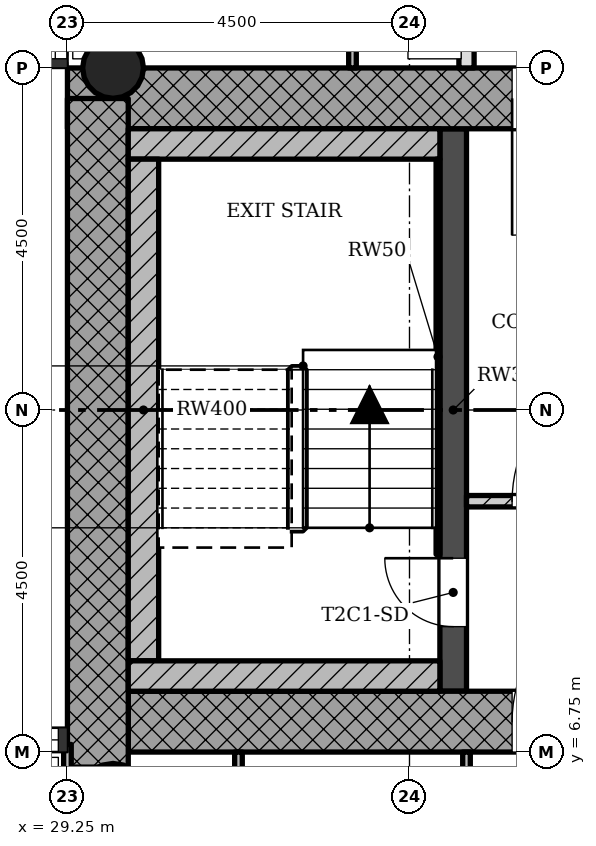
"""IFC4 building model, lengths in metres.
Left out: names, types, materials, properties, quantities, classifications, styles, units other than length and angle.
Written with IfcOpenShell. Run it as: python <this file> out.ifc"""

import sys

from ifc_helpers import new_model, si_unit, direction, frame, frame_2d, origin, origin_2d, place, context, subcontext, project, spatial, rectangle, hollow_circle, extrude, element, fill, save


model = new_model("IFC4")
c1 = context("Model", 3, precision=1e-05, world=origin(), true_north=direction((0.0, 1.0)))
c2 = subcontext(c1, "Body", "Model", "MODEL_VIEW")
j1 = project(units=[si_unit("LENGTHUNIT", "METRE"), si_unit("PLANEANGLEUNIT", "RADIAN")], contexts=[c1])
p1 = place(None, origin())
s1 = spatial("IfcSite", under=j1, at=p1, CompositionType="ELEMENT")
p2 = place(p1, origin())
s2 = spatial("IfcBuilding", under=s1, at=p2, CompositionType="ELEMENT")
p3 = place(p2, frame((0.0, 0.0, 174.5)))
s3 = spatial("IfcBuildingStorey", under=s2, at=p3, CompositionType="ELEMENT", Elevation=174.5)
p4 = place(p3, frame((30.05, 7.15, 0.0), z_axis=(0.0, 0.0, 1.0), x_axis=(1.0, 0.0, 0.0)))
e1 = element("IfcWall", 1, at=p4, inside=s3, PredefinedType="SHEAR", context=c2, shape_type="SweptSolid", body=[
    extrude(rectangle(XDim=12.7, YDim=0.8, at=frame_2d((6.35, 0.0))), origin(), (0.0, 0.0, 1.0), 3.4),
])
p5 = place(p4, frame((5.05, 0.0, 0.0)))
e2 = element("IfcOpeningElement", 2, at=p5, cuts=e1, PredefinedType="OPENING", context=c2, shape_type="SweptSolid", body=[
    extrude(rectangle(XDim=1.8, YDim=2.1, at=frame_2d((0.9, 1.05))), frame((0.0, 0.41, 0.0), z_axis=(0.0, -1.0, 0.0), x_axis=(1.0, 0.0, 0.0)), (0.0, 0.0, 1.0), 0.82),
])
p6 = place(p3, frame((41.95, 15.35, 0.0), z_axis=(0.0, 0.0, 1.0), x_axis=(-1.0, 0.0, 0.0)))
e3 = element("IfcWall", 3, at=p6, inside=s3, PredefinedType="SHEAR", context=c2, shape_type="SweptSolid", body=[
    extrude(rectangle(XDim=12.7, YDim=0.8, at=frame_2d((6.35, 0.0))), origin(), (0.0, 0.0, 1.0), 3.4),
])
p7 = place(p6, frame((5.05, 0.0, 0.0)))
e4 = element("IfcOpeningElement", 4, at=p7, cuts=e3, PredefinedType="OPENING", context=c2, shape_type="SweptSolid", body=[
    extrude(rectangle(XDim=1.8, YDim=2.1, at=frame_2d((0.9, 1.05))), frame((0.0, 0.41, 0.0), z_axis=(0.0, -1.0, 0.0), x_axis=(1.0, 0.0, 0.0)), (0.0, 0.0, 1.0), 0.82),
])
p8 = place(p3, frame((29.65, 15.348, 0.0), z_axis=(0.0, 0.0, 1.0), x_axis=(0.0, -1.0, 0.0)))
e5 = element("IfcWall", 5, at=p8, inside=s3, PredefinedType="SHEAR", context=c2, shape_type="SweptSolid", body=[
    extrude(rectangle(XDim=8.796, YDim=0.8, at=frame_2d((4.398, 0.0))), origin(), (0.0, 0.0, 1.0), 3.4),
])
p9 = place(p3, frame((34.325, 7.55, 0.0), z_axis=(0.0, 0.0, 1.0), x_axis=(0.0, 1.0, 0.0)))
e6 = element("IfcWall", 6, at=p9, inside=s3, PredefinedType="SHEAR", context=c2, shape_type="SweptSolid", body=[
    extrude(rectangle(XDim=7.4, YDim=0.35, at=frame_2d((3.7, 0.0))), origin(), (0.0, 0.0, 1.0), 3.4),
])
p10 = place(p9, frame((0.85, 0.0, 0.0)))
e7 = element("IfcOpeningElement", 7, at=p10, cuts=e6, PredefinedType="OPENING", context=c2, shape_type="SweptSolid", body=[
    extrude(rectangle(XDim=0.9, YDim=2.1, at=frame_2d((0.45, 1.05))), frame((0.0, 0.185, 0.0), z_axis=(0.0, -1.0, 0.0), x_axis=(1.0, 0.0, 0.0)), (0.0, 0.0, 1.0), 0.37),
])
p11 = place(p3, frame((29.85, 15.75, 0.0), z_axis=(0.0, 0.0, 1.0), x_axis=(1.0, 0.0, 0.0)))
e8 = element("IfcColumn", 8, at=p11, inside=s3, PredefinedType="COLUMN", context=c2, shape_type="SweptSolid", body=[
    extrude(hollow_circle(Radius=0.4, WallThickness=0.028, at=origin_2d()), origin(), (0.0, 0.0, 1.0), 3.4),
])
p12 = place(p3, frame((29.85, 6.15, 0.0), z_axis=(0.0, 0.0, 1.0), x_axis=(1.0, 0.0, 0.0)))
e9 = element("IfcColumn", 9, at=p12, inside=s3, PredefinedType="COLUMN", context=c2, shape_type="SweptSolid", body=[
    extrude(hollow_circle(Radius=0.45, WallThickness=0.032, at=origin_2d()), origin(), (0.0, 0.0, 1.0), 3.4),
])
p13 = place(p3, frame((37.5, 10.05, 0.0), z_axis=(0.0, 0.0, 1.0), x_axis=(-1.0, 0.0, 0.0)))
e10 = element("IfcWall", 10, at=p13, inside=s3, PredefinedType="PARTITIONING", context=c2, shape_type="SweptSolid", body=[
    extrude(rectangle(XDim=3.0, YDim=0.15, at=frame_2d((1.5, 0.0))), origin(), (0.0, 0.0, 1.0), 3.0),
])
p14 = place(p13, frame((0.6, 0.0, 0.0)))
e11 = element("IfcOpeningElement", 11, at=p14, cuts=e10, PredefinedType="OPENING", context=c2, shape_type="SweptSolid", body=[
    extrude(rectangle(XDim=1.8, YDim=2.1, at=frame_2d((0.9, 1.05))), frame((0.0, 0.085, 0.0), z_axis=(0.0, -1.0, 0.0), x_axis=(1.0, 0.0, 0.0)), (0.0, 0.0, 1.0), 0.17),
])
p15 = place(p3, frame((34.5, 4.5, 0.0), z_axis=(0.0, 0.0, 1.0), x_axis=(0.0, 1.0, 0.0)))
e12 = element("IfcWall", 12, at=p15, inside=s3, PredefinedType="PARTITIONING", context=c2, shape_type="SweptSolid", body=[
    extrude(rectangle(XDim=2.25, YDim=0.1, at=frame_2d((1.125, 0.0))), origin(), (0.0, 0.0, 1.0), 3.0),
])
p16 = place(p3, frame((34.5, 15.75, 0.0), z_axis=(0.0, 0.0, 1.0), x_axis=(0.0, 1.0, 0.0)))
e13 = element("IfcWall", 13, at=p16, inside=s3, PredefinedType="SOLIDWALL", context=c2, shape_type="SweptSolid", body=[
    extrude(rectangle(XDim=4.5, YDim=0.2, at=frame_2d((2.25, 0.0))), origin(), (0.0, 0.0, 1.0), 3.0),
])
p17 = place(p16, frame((3.0, 0.0, 0.0)))
e14 = element("IfcOpeningElement", 14, at=p17, cuts=e13, PredefinedType="OPENING", context=c2, shape_type="SweptSolid", body=[
    extrude(rectangle(XDim=0.9, YDim=2.1, at=frame_2d((0.45, 1.05))), frame((0.0, 0.11, 0.0), z_axis=(0.0, -1.0, 0.0), x_axis=(1.0, 0.0, 0.0)), (0.0, 0.0, 1.0), 0.22),
])
p18 = place(p3, frame((33.0, 15.75, 0.0), z_axis=(0.0, 0.0, 1.0), x_axis=(0.0, 1.0, 0.0)))
e15 = element("IfcWall", 15, at=p18, inside=s3, PredefinedType="PARTITIONING", context=c2, shape_type="SweptSolid", body=[
    extrude(rectangle(XDim=2.4, YDim=0.1, at=frame_2d((1.2, 0.0))), origin(), (0.0, 0.0, 1.0), 3.0),
])
p19 = place(p18, frame((0.75, 0.0, 0.0)))
e16 = element("IfcOpeningElement", 16, at=p19, cuts=e15, PredefinedType="OPENING", context=c2, shape_type="SweptSolid", body=[
    extrude(rectangle(XDim=0.9, YDim=2.1, at=frame_2d((0.45, 1.05))), frame((0.0, 0.06, 0.0), z_axis=(0.0, -1.0, 0.0), x_axis=(1.0, 0.0, 0.0)), (0.0, 0.0, 1.0), 0.12),
])
p20 = place(p3, frame((31.5, 0.9, 0.0), z_axis=(0.0, 0.0, 1.0), x_axis=(0.0, 1.0, 0.0)))
e17 = element("IfcWall", 17, at=p20, inside=s3, PredefinedType="PARTITIONING", context=c2, shape_type="SweptSolid", body=[
    extrude(rectangle(XDim=5.85, YDim=0.1, at=frame_2d((2.925, 0.0))), origin(), (0.0, 0.0, 1.0), 3.0),
])
p21 = place(p20, frame((1.35, 0.0, 0.0)))
e18 = element("IfcOpeningElement", 18, at=p21, cuts=e17, PredefinedType="OPENING", context=c2, shape_type="SweptSolid", body=[
    extrude(rectangle(XDim=0.9, YDim=2.1, at=frame_2d((0.45, 1.05))), frame((0.0, 0.06, 0.0), z_axis=(0.0, -1.0, 0.0), x_axis=(1.0, 0.0, 0.0)), (0.0, 0.0, 1.0), 0.12),
])
p22 = place(p3, frame((29.25, 0.9, 0.0), z_axis=(0.0, 0.0, 1.0), x_axis=(0.0, 1.0, 0.0)))
e19 = element("IfcWall", 19, at=p22, inside=s3, PredefinedType="PARTITIONING", context=c2, shape_type="SweptSolid", body=[
    extrude(rectangle(XDim=5.95, YDim=0.1, at=frame_2d((2.975, 0.0))), origin(), (0.0, 0.0, 1.0), 3.0),
])
p23 = place(p3, frame((34.15, 14.75, 0.0), z_axis=(0.0, 0.0, 1.0), x_axis=(-1.0, 0.0, 0.0)))
e20 = element("IfcWall", 20, at=p23, inside=s3, PredefinedType="SHEAR", context=c2, shape_type="SweptSolid", body=[
    extrude(rectangle(XDim=4.1, YDim=0.4, at=frame_2d((2.05, 0.0))), origin(), (0.0, 0.0, 1.0), 3.4),
])
p24 = place(p3, frame((30.25, 7.95, 0.0), z_axis=(0.0, 0.0, 1.0), x_axis=(0.0, 1.0, 0.0)))
e21 = element("IfcWall", 21, at=p24, inside=s3, PredefinedType="SHEAR", context=c2, shape_type="SweptSolid", body=[
    extrude(rectangle(XDim=6.6, YDim=0.4, at=frame_2d((3.3, 0.0))), origin(), (0.0, 0.0, 1.0), 3.4),
])
p25 = place(p3, frame((34.15, 7.75, 0.0), z_axis=(0.0, 0.0, 1.0), x_axis=(-1.0, 0.0, 0.0)))
e22 = element("IfcWall", 22, at=p25, inside=s3, PredefinedType="SHEAR", context=c2, shape_type="SweptSolid", body=[
    extrude(rectangle(XDim=4.1, YDim=0.4, at=frame_2d((2.05, 0.0))), origin(), (0.0, 0.0, 1.0), 3.4),
])
p26 = place(p3, frame((34.125, 9.35, 0.0), z_axis=(0.0, 0.0, 1.0), x_axis=(0.0, 1.0, 0.0)))
e23 = element("IfcWall", 23, at=p26, inside=s3, PredefinedType="SHEAR", context=c2, shape_type="SweptSolid", body=[
    extrude(rectangle(XDim=5.2, YDim=0.05, at=frame_2d((2.6, 0.0))), origin(), (0.0, 0.0, 1.0), 3.4),
])
p27 = place(p14, origin())
e24 = element("IfcDoor", 24, at=p27, inside=s3, OperationType="SINGLE_SWING_LEFT", PredefinedType="DOOR", context=c2, shape_type="SweptSolid", body=[
    extrude(rectangle(XDim=1.8, YDim=2.1, at=frame_2d((0.9, 1.05))), frame((0.0, 0.025, 0.0), z_axis=(0.0, -1.0, 0.0), x_axis=(1.0, 0.0, 0.0)), (0.0, 0.0, 1.0), 0.05),
])
fill(e11, e24)
p28 = place(p10, origin())
e25 = element("IfcDoor", 25, at=p28, inside=s3, OperationType="SINGLE_SWING_LEFT", PredefinedType="DOOR", context=c2, shape_type="SweptSolid", body=[
    extrude(rectangle(XDim=0.9, YDim=2.1, at=frame_2d((0.45, 1.05))), frame((0.0, 0.025, 0.0), z_axis=(0.0, -1.0, 0.0), x_axis=(1.0, 0.0, 0.0)), (0.0, 0.0, 1.0), 0.05),
])
fill(e7, e25)
p29 = place(p5, origin())
e26 = element("IfcDoor", 26, at=p29, inside=s3, OperationType="SINGLE_SWING_LEFT", PredefinedType="DOOR", context=c2, shape_type="SweptSolid", body=[
    extrude(rectangle(XDim=1.8, YDim=2.1, at=frame_2d((0.9, 1.05))), frame((0.0, 0.025, 0.0), z_axis=(0.0, -1.0, 0.0), x_axis=(1.0, 0.0, 0.0)), (0.0, 0.0, 1.0), 0.05),
])
fill(e2, e26)
p30 = place(p7, origin())
e27 = element("IfcDoor", 27, at=p30, inside=s3, OperationType="SINGLE_SWING_LEFT", PredefinedType="DOOR", context=c2, shape_type="SweptSolid", body=[
    extrude(rectangle(XDim=1.8, YDim=2.1, at=frame_2d((0.9, 1.05))), frame((0.0, 0.025, 0.0), z_axis=(0.0, -1.0, 0.0), x_axis=(1.0, 0.0, 0.0)), (0.0, 0.0, 1.0), 0.05),
])
fill(e4, e27)
save(model, sys.argv[1])
